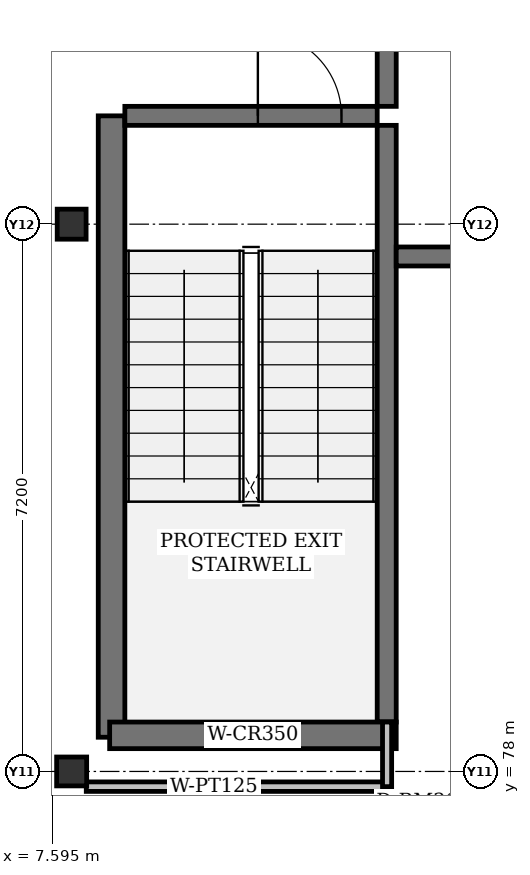
"""IFC4 building model, lengths in metres.
Left out: names, types, materials, properties, quantities, classifications, styles, units other than length and angle.
Written with IfcOpenShell. Run it as: python <this file> out.ifc"""

import sys

from ifc_helpers import new_model, si_unit, direction, frame, frame_2d, origin, origin_2d, place, context, subcontext, project, spatial, rectangle, i_section, extrude, element, fill, save


model = new_model("IFC4")
c1 = context("Model", 3, precision=1e-05, world=origin(), true_north=direction((0.0, 1.0)))
c2 = subcontext(c1, "Body", "Model", "MODEL_VIEW")
j1 = project(units=[si_unit("LENGTHUNIT", "METRE"), si_unit("PLANEANGLEUNIT", "RADIAN")], contexts=[c1])
p1 = place(None, origin())
s1 = spatial("IfcSite", under=j1, at=p1, CompositionType="ELEMENT")
p2 = place(p1, origin())
s2 = spatial("IfcBuilding", under=s1, at=p2, CompositionType="ELEMENT")
p3 = place(p2, frame((0.0, 0.0, 9.9)))
s3 = spatial("IfcBuildingStorey", under=s2, at=p3, CompositionType="ELEMENT", Elevation=9.9)
for number, where, z_axis, x_axis in (
    (1, (7.85, 78.0, 0.0), (0.0, 0.0, 1.0), (1.0, 0.0, 0.0)),
    (2, (7.85, 85.2, 0.0), (0.0, 0.0, 1.0), (0.0, 1.0, 0.0)),
):
    element("IfcColumn", number, at=place(p3, frame(where, z_axis=z_axis, x_axis=x_axis)), inside=s3, PredefinedType="COLUMN", context=c2, shape_type="SweptSolid", body=[
        extrude(i_section(OverallWidth=0.395, OverallDepth=0.38, WebThickness=0.019, FlangeThickness=0.03, FilletRadius=0.015, at=origin_2d()), origin(), (0.0, 0.0, 1.0), 4.2),
    ])
p4 = place(p3, frame((8.375, 78.45, 0.0), z_axis=(0.0, 0.0, 1.0), x_axis=(0.0, 1.0, 0.0)))
e3 = element("IfcWall", 3, at=p4, inside=s3, PredefinedType="SHEAR", context=c2, shape_type="SweptSolid", body=[
    extrude(rectangle(XDim=8.175, YDim=0.35, at=frame_2d((4.087, 0.0))), origin(), (0.0, 0.0, 1.0), 4.2),
])
p5 = place(p3, frame((11.995, 78.65, 0.0), z_axis=(0.0, 0.0, 1.0), x_axis=(0.0, 1.0, 0.0)))
e4 = element("IfcWall", 4, at=p5, inside=s3, PredefinedType="SHEAR", context=c2, shape_type="SweptSolid", body=[
    extrude(rectangle(XDim=7.85, YDim=0.25, at=frame_2d((3.925, 0.0))), origin(), (0.0, 0.0, 1.0), 4.2),
])
p6 = place(p3, frame((11.995, 86.75, 0.0), z_axis=(0.0, 0.0, 1.0), x_axis=(0.0, 1.0, 0.0)))
e5 = element("IfcWall", 5, at=p6, inside=s3, PredefinedType="SHEAR", context=c2, shape_type="SweptSolid", body=[
    extrude(rectangle(XDim=3.9, YDim=0.25, at=frame_2d((1.95, 0.0))), origin(), (0.0, 0.0, 1.0), 4.2),
])
p7 = place(p6, frame((1.3, 0.0, 0.0)))
e6 = element("IfcOpeningElement", 6, at=p7, cuts=e5, PredefinedType="OPENING", context=c2, shape_type="SweptSolid", body=[
    extrude(rectangle(XDim=1.25, YDim=2.2, at=frame_2d((0.625, 1.1))), frame((0.0, 0.125, 0.0), z_axis=(0.0, -1.0, 0.0), x_axis=(1.0, 0.0, 0.0)), (0.0, 0.0, 1.0), 0.25),
])
p8 = place(p3, frame((8.35, 78.475, 0.0), z_axis=(0.0, 0.0, 1.0), x_axis=(1.0, 0.0, 0.0)))
e7 = element("IfcWall", 7, at=p8, inside=s3, PredefinedType="SHEAR", context=c2, shape_type="SweptSolid", body=[
    extrude(rectangle(XDim=3.77, YDim=0.35, at=frame_2d((1.885, 0.0))), origin(), (0.0, 0.0, 1.0), 4.2),
])
p9 = place(p3, frame((8.55, 86.625, 0.0), z_axis=(0.0, 0.0, 1.0), x_axis=(1.0, 0.0, 0.0)))
e8 = element("IfcWall", 8, at=p9, inside=s3, PredefinedType="SHEAR", context=c2, shape_type="SweptSolid", body=[
    extrude(rectangle(XDim=3.32, YDim=0.25, at=frame_2d((1.66, 0.0))), origin(), (0.0, 0.0, 1.0), 4.2),
])
p10 = place(p9, frame((1.75, 0.0, 0.0)))
e9 = element("IfcOpeningElement", 9, at=p10, cuts=e8, PredefinedType="OPENING", context=c2, shape_type="SweptSolid", body=[
    extrude(rectangle(XDim=1.1, YDim=2.15, at=frame_2d((0.55, 1.075))), frame((0.0, 0.125, 0.0), z_axis=(0.0, -1.0, 0.0), x_axis=(1.0, 0.0, 0.0)), (0.0, 0.0, 1.0), 0.25),
])
p11 = place(p3, frame((12.12, 84.775, 0.0), z_axis=(0.0, 0.0, 1.0), x_axis=(1.0, 0.0, 0.0)))
e10 = element("IfcWall", 10, at=p11, inside=s3, PredefinedType="SHEAR", context=c2, shape_type="SweptSolid", body=[
    extrude(rectangle(XDim=4.03, YDim=0.25, at=frame_2d((2.015, 0.0))), origin(), (0.0, 0.0, 1.0), 4.2),
])
p12 = place(p11, frame((1.3, 0.0, 0.0)))
e11 = element("IfcOpeningElement", 11, at=p12, cuts=e10, PredefinedType="OPENING", context=c2, shape_type="SweptSolid", body=[
    extrude(rectangle(XDim=1.4, YDim=2.25, at=frame_2d((0.7, 1.125))), frame((0.0, 0.125, 0.0), z_axis=(0.0, -1.0, 0.0), x_axis=(1.0, 0.0, 0.0)), (0.0, 0.0, 1.0), 0.25),
])
p13 = place(p3, frame((8.042, 77.8, 0.0), z_axis=(0.0, 0.0, 1.0), x_axis=(1.0, 0.0, 0.0)))
e12 = element("IfcWall", 12, at=p13, inside=s3, PredefinedType="PARTITIONING", context=c2, shape_type="SweptSolid", body=[
    extrude(rectangle(XDim=3.958, YDim=0.125, at=frame_2d((1.979, 0.0))), origin(), (0.0, 0.0, 1.0), 3.466),
])
p14 = place(p3, frame((12.0, 77.8, 0.0), z_axis=(0.0, 0.0, 1.0), x_axis=(0.0, 1.0, 0.0)))
e13 = element("IfcWall", 13, at=p14, inside=s3, PredefinedType="PARTITIONING", context=c2, shape_type="SweptSolid", body=[
    extrude(rectangle(XDim=0.85, YDim=0.12, at=frame_2d((0.425, 0.0))), origin(), (0.0, 0.0, 1.0), 3.466),
])
p15 = place(p10, origin())
e14 = element("IfcDoor", 14, at=p15, inside=s3, OperationType="SINGLE_SWING_LEFT", PredefinedType="DOOR", context=c2, shape_type="SweptSolid", body=[
    extrude(rectangle(XDim=1.1, YDim=2.15, at=frame_2d((0.55, 1.075))), frame((0.0, 0.025, 0.0), z_axis=(0.0, -1.0, 0.0), x_axis=(1.0, 0.0, 0.0)), (0.0, 0.0, 1.0), 0.05),
])
fill(e9, e14)
save(model, sys.argv[1])
